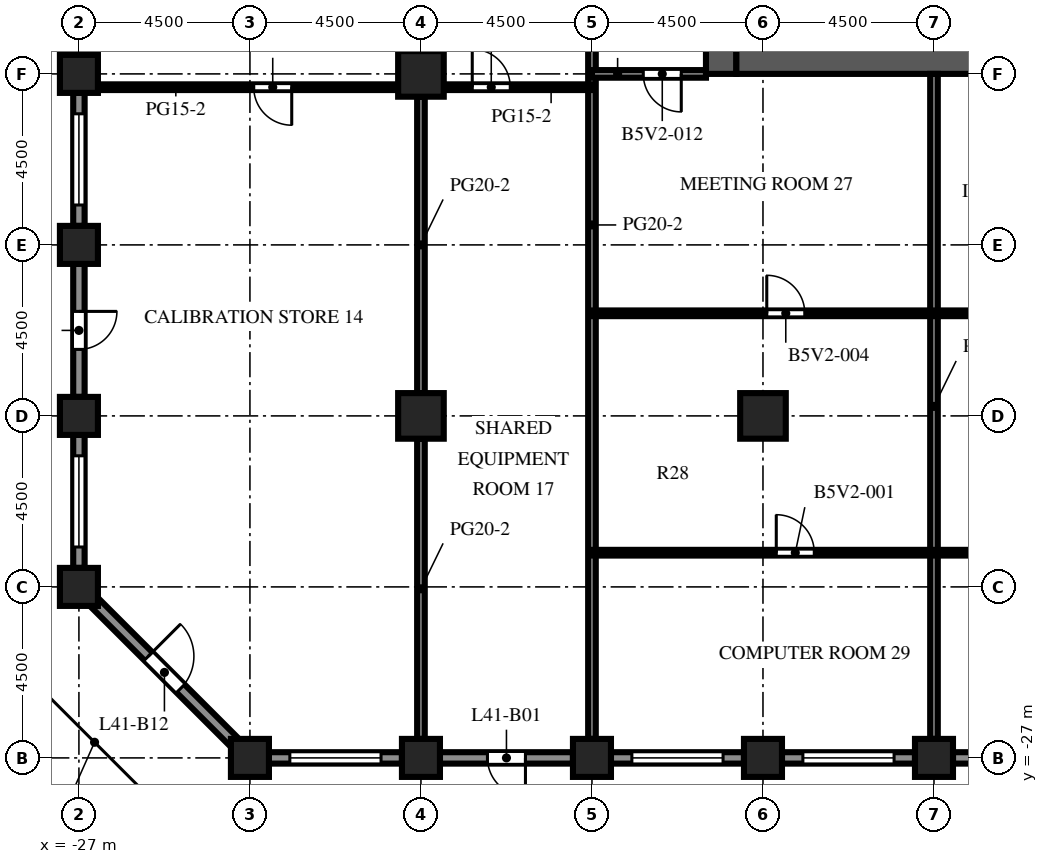
"""IFC4 building model, lengths in metres.
Left out: names, types, materials, properties, quantities, classifications, styles, units other than length and angle.
Written with IfcOpenShell. Run it as: python <this file> out.ifc"""

import sys

from ifc_helpers import new_model, si_unit, direction, frame, frame_2d, origin, origin_2d, place, context, subcontext, project, spatial, rectangle, extrude, element, fill, save


model = new_model("IFC4")
c1 = context("Model", 3, precision=1e-05, world=origin(), true_north=direction((0.0, 1.0)))
c2 = subcontext(c1, "Body", "Model", "MODEL_VIEW")
j1 = project(units=[si_unit("LENGTHUNIT", "METRE"), si_unit("PLANEANGLEUNIT", "RADIAN")], contexts=[c1])
p1 = place(None, origin())
s1 = spatial("IfcSite", under=j1, at=p1, CompositionType="ELEMENT")
p2 = place(p1, origin())
s2 = spatial("IfcBuilding", under=s1, at=p2, CompositionType="ELEMENT")
p3 = place(p2, frame((0.0, 0.0, 181.4)))
s3 = spatial("IfcBuildingStorey", under=s2, at=p3, CompositionType="ELEMENT", Elevation=181.4)
for number, where, z_axis, x_axis in (
    (1, (-27.0, -22.5, 0.0), (0.0, 0.0, 1.0), (1.0, 0.0, 0.0)),
    (2, (-27.0, -18.0, 0.0), (0.0, 0.0, 1.0), (1.0, 0.0, 0.0)),
    (3, (-27.0, -13.5, 0.0), (0.0, 0.0, 1.0), (1.0, 0.0, 0.0)),
    (4, (-27.0, -9.0, 0.0), (0.0, 0.0, 1.0), (1.0, 0.0, 0.0)),
    (5, (-22.5, -27.0, 0.0), (0.0, 0.0, 1.0), (1.0, 0.0, 0.0)),
    (6, (-18.0, -27.0, 0.0), (0.0, 0.0, 1.0), (1.0, 0.0, 0.0)),
    (7, (-13.5, -27.0, 0.0), (0.0, 0.0, 1.0), (1.0, 0.0, 0.0)),
    (8, (-9.0, -27.0, 0.0), (0.0, 0.0, 1.0), (1.0, 0.0, 0.0)),
    (9, (-4.5, -27.0, 0.0), (0.0, 0.0, 1.0), (1.0, 0.0, 0.0)),
):
    element("IfcColumn", number, at=place(p3, frame(where, z_axis=z_axis, x_axis=x_axis)), inside=s3, PredefinedType="COLUMN", context=c2, shape_type="SweptSolid", body=[
        extrude(rectangle(XDim=1.0, YDim=1.0, at=origin_2d()), origin(), (0.0, 0.0, 1.0), 4.1),
    ])
for number, where, z_axis, x_axis in (
    (10, (-18.0, -18.0, 0.0), (0.0, 0.0, 1.0), (1.0, 0.0, 0.0)),
    (11, (-18.0, -9.0, 0.0), (0.0, 0.0, 1.0), (1.0, 0.0, 0.0)),
    (12, (-9.0, -18.0, 0.0), (0.0, 0.0, 1.0), (1.0, 0.0, 0.0)),
):
    element("IfcColumn", number, at=place(p3, frame(where, z_axis=z_axis, x_axis=x_axis)), inside=s3, PredefinedType="COLUMN", context=c2, shape_type="SweptSolid", body=[
        extrude(rectangle(XDim=1.2, YDim=1.2, at=origin_2d()), origin(), (0.0, 0.0, 1.0), 4.1),
    ])
p4 = place(p3, frame((-10.1, -9.0, 0.0), z_axis=(0.0, 0.0, 1.0), x_axis=(0.0, 1.0, 0.0)))
e13 = element("IfcWall", 13, at=p4, inside=s3, PredefinedType="SHEAR", context=c2, shape_type="SweptSolid", body=[
    extrude(rectangle(XDim=27.5, YDim=0.8, at=frame_2d((13.75, 0.0))), origin(), (0.0, 0.0, 1.0), 4.1),
])
p5 = place(p4, frame((12.55, 0.0, 0.0)))
e14 = element("IfcOpeningElement", 14, at=p5, cuts=e13, PredefinedType="OPENING", context=c2, shape_type="SweptSolid", body=[
    extrude(rectangle(XDim=2.4, YDim=2.4, at=frame_2d((1.2, 1.2))), frame((0.0, 0.41, 0.0), z_axis=(0.0, -1.0, 0.0), x_axis=(1.0, 0.0, 0.0)), (0.0, 0.0, 1.0), 0.82),
])
p6 = place(p4, frame((6.825, 0.0, 0.0)))
e15 = element("IfcOpeningElement", 15, at=p6, cuts=e13, PredefinedType="OPENING", context=c2, shape_type="SweptSolid", body=[
    extrude(rectangle(XDim=1.2, YDim=2.1, at=frame_2d((0.6, 1.05))), frame((0.0, 0.41, 0.0), z_axis=(0.0, -1.0, 0.0), x_axis=(1.0, 0.0, 0.0)), (0.0, 0.0, 1.0), 0.82),
])
p7 = place(p4, frame((19.475, 0.0, 0.0)))
e16 = element("IfcOpeningElement", 16, at=p7, cuts=e13, PredefinedType="OPENING", context=c2, shape_type="SweptSolid", body=[
    extrude(rectangle(XDim=1.2, YDim=2.1, at=frame_2d((0.6, 1.05))), frame((0.0, 0.41, 0.0), z_axis=(0.0, -1.0, 0.0), x_axis=(1.0, 0.0, 0.0)), (0.0, 0.0, 1.0), 0.82),
])
p8 = place(p3, frame((-9.7, -8.6, 0.0), z_axis=(0.0, 0.0, 1.0), x_axis=(1.0, 0.0, 0.0)))
e17 = element("IfcWall", 17, at=p8, inside=s3, PredefinedType="SHEAR", context=c2, shape_type="SweptSolid", body=[
    extrude(rectangle(XDim=10.4, YDim=0.8, at=frame_2d((5.2, 0.0))), origin(), (0.0, 0.0, 1.0), 4.1),
])
p9 = place(p3, frame((-18.5, -27.0, 0.0), z_axis=(0.0, 0.0, 1.0), x_axis=(-1.0, 0.0, 0.0)))
e18 = element("IfcWall", 18, at=p9, inside=s3, PredefinedType="SOLIDWALL", context=c2, shape_type="SweptSolid", body=[
    extrude(rectangle(XDim=3.5, YDim=0.3, at=frame_2d((1.75, 0.0))), origin(), (0.0, 0.0, 1.0), 2.7),
])
p10 = place(p9, frame((0.55, 0.0, 0.8)))
e19 = element("IfcOpeningElement", 19, at=p10, cuts=e18, PredefinedType="OPENING", context=c2, shape_type="SweptSolid", body=[
    extrude(rectangle(XDim=2.4, YDim=1.7, at=frame_2d((1.2, 0.85))), frame((0.0, 0.16, 0.0), z_axis=(0.0, -1.0, 0.0), x_axis=(1.0, 0.0, 0.0)), (0.0, 0.0, 1.0), 0.32),
])
p11 = place(p3, frame((-14.0, -27.0, 0.0), z_axis=(0.0, 0.0, 1.0), x_axis=(-1.0, 0.0, 0.0)))
e20 = element("IfcWall", 20, at=p11, inside=s3, PredefinedType="SOLIDWALL", context=c2, shape_type="SweptSolid", body=[
    extrude(rectangle(XDim=3.5, YDim=0.3, at=frame_2d((1.75, 0.0))), origin(), (0.0, 0.0, 1.0), 2.7),
])
p12 = place(p11, frame((1.25, 0.0, 0.0)))
e21 = element("IfcOpeningElement", 21, at=p12, cuts=e20, PredefinedType="OPENING", context=c2, shape_type="SweptSolid", body=[
    extrude(rectangle(XDim=1.0, YDim=2.2, at=frame_2d((0.5, 1.1))), frame((0.0, 0.16, 0.0), z_axis=(0.0, -1.0, 0.0), x_axis=(1.0, 0.0, 0.0)), (0.0, 0.0, 1.0), 0.32),
])
p13 = place(p3, frame((-9.5, -27.0, 0.0), z_axis=(0.0, 0.0, 1.0), x_axis=(-1.0, 0.0, 0.0)))
e22 = element("IfcWall", 22, at=p13, inside=s3, PredefinedType="SOLIDWALL", context=c2, shape_type="SweptSolid", body=[
    extrude(rectangle(XDim=3.5, YDim=0.3, at=frame_2d((1.75, 0.0))), origin(), (0.0, 0.0, 1.0), 2.7),
])
p14 = place(p13, frame((0.55, 0.0, 0.8)))
e23 = element("IfcOpeningElement", 23, at=p14, cuts=e22, PredefinedType="OPENING", context=c2, shape_type="SweptSolid", body=[
    extrude(rectangle(XDim=2.4, YDim=1.7, at=frame_2d((1.2, 0.85))), frame((0.0, 0.16, 0.0), z_axis=(0.0, -1.0, 0.0), x_axis=(1.0, 0.0, 0.0)), (0.0, 0.0, 1.0), 0.32),
])
p15 = place(p3, frame((-5.0, -27.0, 0.0), z_axis=(0.0, 0.0, 1.0), x_axis=(-1.0, 0.0, 0.0)))
e24 = element("IfcWall", 24, at=p15, inside=s3, PredefinedType="SOLIDWALL", context=c2, shape_type="SweptSolid", body=[
    extrude(rectangle(XDim=3.5, YDim=0.3, at=frame_2d((1.75, 0.0))), origin(), (0.0, 0.0, 1.0), 2.7),
])
p16 = place(p15, frame((0.55, 0.0, 0.8)))
e25 = element("IfcOpeningElement", 25, at=p16, cuts=e24, PredefinedType="OPENING", context=c2, shape_type="SweptSolid", body=[
    extrude(rectangle(XDim=2.4, YDim=1.7, at=frame_2d((1.2, 0.85))), frame((0.0, 0.16, 0.0), z_axis=(0.0, -1.0, 0.0), x_axis=(1.0, 0.0, 0.0)), (0.0, 0.0, 1.0), 0.32),
])
p17 = place(p3, frame((-0.5, -27.0, 0.0), z_axis=(0.0, 0.0, 1.0), x_axis=(-1.0, 0.0, 0.0)))
e26 = element("IfcWall", 26, at=p17, inside=s3, PredefinedType="SOLIDWALL", context=c2, shape_type="SweptSolid", body=[
    extrude(rectangle(XDim=3.5, YDim=0.3, at=frame_2d((1.75, 0.0))), origin(), (0.0, 0.0, 1.0), 2.7),
])
p18 = place(p17, frame((0.55, 0.0, 0.8)))
e27 = element("IfcOpeningElement", 27, at=p18, cuts=e26, PredefinedType="OPENING", context=c2, shape_type="SweptSolid", body=[
    extrude(rectangle(XDim=2.4, YDim=1.7, at=frame_2d((1.2, 0.85))), frame((0.0, 0.16, 0.0), z_axis=(0.0, -1.0, 0.0), x_axis=(1.0, 0.0, 0.0)), (0.0, 0.0, 1.0), 0.32),
])
p19 = place(p3, frame((-27.0, -8.5, 0.0), z_axis=(0.0, 0.0, 1.0), x_axis=(0.0, 1.0, 0.0)))
e28 = element("IfcWall", 28, at=p19, inside=s3, PredefinedType="SOLIDWALL", context=c2, shape_type="SweptSolid", body=[
    extrude(rectangle(XDim=3.5, YDim=0.3, at=frame_2d((1.75, 0.0))), origin(), (0.0, 0.0, 1.0), 2.7),
])
p20 = place(p19, frame((0.55, 0.0, 0.8)))
e29 = element("IfcOpeningElement", 29, at=p20, cuts=e28, PredefinedType="OPENING", context=c2, shape_type="SweptSolid", body=[
    extrude(rectangle(XDim=2.4, YDim=1.7, at=frame_2d((1.2, 0.85))), frame((0.0, 0.16, 0.0), z_axis=(0.0, -1.0, 0.0), x_axis=(1.0, 0.0, 0.0)), (0.0, 0.0, 1.0), 0.32),
])
p21 = place(p3, frame((-27.0, -13.0, 0.0), z_axis=(0.0, 0.0, 1.0), x_axis=(0.0, 1.0, 0.0)))
e30 = element("IfcWall", 30, at=p21, inside=s3, PredefinedType="SOLIDWALL", context=c2, shape_type="SweptSolid", body=[
    extrude(rectangle(XDim=3.5, YDim=0.3, at=frame_2d((1.75, 0.0))), origin(), (0.0, 0.0, 1.0), 2.7),
])
p22 = place(p21, frame((0.55, 0.0, 0.8)))
e31 = element("IfcOpeningElement", 31, at=p22, cuts=e30, PredefinedType="OPENING", context=c2, shape_type="SweptSolid", body=[
    extrude(rectangle(XDim=2.4, YDim=1.7, at=frame_2d((1.2, 0.85))), frame((0.0, 0.16, 0.0), z_axis=(0.0, -1.0, 0.0), x_axis=(1.0, 0.0, 0.0)), (0.0, 0.0, 1.0), 0.32),
])
p23 = place(p3, frame((-27.0, -17.5, 0.0), z_axis=(0.0, 0.0, 1.0), x_axis=(0.0, 1.0, 0.0)))
e32 = element("IfcWall", 32, at=p23, inside=s3, PredefinedType="SOLIDWALL", context=c2, shape_type="SweptSolid", body=[
    extrude(rectangle(XDim=3.5, YDim=0.3, at=frame_2d((1.75, 0.0))), origin(), (0.0, 0.0, 1.0), 2.7),
])
p24 = place(p23, frame((1.25, 0.0, 0.0)))
e33 = element("IfcOpeningElement", 33, at=p24, cuts=e32, PredefinedType="OPENING", context=c2, shape_type="SweptSolid", body=[
    extrude(rectangle(XDim=1.0, YDim=2.2, at=frame_2d((0.5, 1.1))), frame((0.0, 0.16, 0.0), z_axis=(0.0, -1.0, 0.0), x_axis=(1.0, 0.0, 0.0)), (0.0, 0.0, 1.0), 0.32),
])
p25 = place(p3, frame((-27.0, -22.0, 0.0), z_axis=(0.0, 0.0, 1.0), x_axis=(0.0, 1.0, 0.0)))
e34 = element("IfcWall", 34, at=p25, inside=s3, PredefinedType="SOLIDWALL", context=c2, shape_type="SweptSolid", body=[
    extrude(rectangle(XDim=3.5, YDim=0.3, at=frame_2d((1.75, 0.0))), origin(), (0.0, 0.0, 1.0), 2.7),
])
p26 = place(p25, frame((0.55, 0.0, 0.8)))
e35 = element("IfcOpeningElement", 35, at=p26, cuts=e34, PredefinedType="OPENING", context=c2, shape_type="SweptSolid", body=[
    extrude(rectangle(XDim=2.4, YDim=1.7, at=frame_2d((1.2, 0.85))), frame((0.0, 0.16, 0.0), z_axis=(0.0, -1.0, 0.0), x_axis=(1.0, 0.0, 0.0)), (0.0, 0.0, 1.0), 0.32),
])
p27 = place(p3, frame((-22.894, -26.606, 0.0), z_axis=(0.0, 0.0, 1.0), x_axis=(-0.707106781187, 0.707106781187, 0.0)))
e36 = element("IfcWall", 36, at=p27, inside=s3, PredefinedType="SOLIDWALL", context=c2, shape_type="SweptSolid", body=[
    extrude(rectangle(XDim=5.25, YDim=0.3, at=frame_2d((2.625, 0.0))), origin(), (0.0, 0.0, 1.0), 2.7),
])
p28 = place(p27, frame((2.025, 0.0, 0.0)))
e37 = element("IfcOpeningElement", 37, at=p28, cuts=e36, PredefinedType="OPENING", context=c2, shape_type="SweptSolid", body=[
    extrude(rectangle(XDim=1.2, YDim=2.2, at=frame_2d((0.6, 1.1))), frame((0.0, 0.16, 0.0), z_axis=(0.0, -1.0, 0.0), x_axis=(1.0, 0.0, 0.0)), (0.0, 0.0, 1.0), 0.32),
])
p29 = place(p3, frame((-18.0, -26.5, 0.0), z_axis=(0.0, 0.0, 1.0), x_axis=(0.0, 1.0, 0.0)))
e38 = element("IfcWall", 38, at=p29, inside=s3, PredefinedType="PARTITIONING", context=c2, shape_type="SweptSolid", body=[
    extrude(rectangle(XDim=7.9, YDim=0.2, at=frame_2d((3.95, 0.0))), origin(), (0.0, 0.0, 1.0), 3.5),
])
p30 = place(p3, frame((-18.0, -17.4, 0.0), z_axis=(0.0, 0.0, 1.0), x_axis=(0.0, 1.0, 0.0)))
e39 = element("IfcWall", 39, at=p30, inside=s3, PredefinedType="PARTITIONING", context=c2, shape_type="SweptSolid", body=[
    extrude(rectangle(XDim=7.8, YDim=0.2, at=frame_2d((3.9, 0.0))), origin(), (0.0, 0.0, 1.0), 3.5),
])
p31 = place(p3, frame((-13.5, -26.5, 0.0), z_axis=(0.0, 0.0, 1.0), x_axis=(0.0, 1.0, 0.0)))
e40 = element("IfcWall", 40, at=p31, inside=s3, PredefinedType="PARTITIONING", context=c2, shape_type="SweptSolid", body=[
    extrude(rectangle(XDim=29.75, YDim=0.2, at=frame_2d((14.875, 0.0))), origin(), (0.0, 0.0, 1.0), 3.5),
])
p32 = place(p31, frame((27.05, 0.0, 0.0)))
e41 = element("IfcOpeningElement", 41, at=p32, cuts=e40, PredefinedType="OPENING", context=c2, shape_type="SweptSolid", body=[
    extrude(rectangle(XDim=1.0, YDim=2.1, at=frame_2d((0.5, 1.05))), frame((0.0, 0.11, 0.0), z_axis=(0.0, -1.0, 0.0), x_axis=(1.0, 0.0, 0.0)), (0.0, 0.0, 1.0), 0.22),
])
p33 = place(p3, frame((-4.5, -26.5, 0.0), z_axis=(0.0, 0.0, 1.0), x_axis=(0.0, 1.0, 0.0)))
e42 = element("IfcWall", 42, at=p33, inside=s3, PredefinedType="PARTITIONING", context=c2, shape_type="SweptSolid", body=[
    extrude(rectangle(XDim=17.5, YDim=0.2, at=frame_2d((8.75, 0.0))), origin(), (0.0, 0.0, 1.0), 3.5),
])
p34 = place(p3, frame((21.0, -21.6, 0.0), z_axis=(0.0, 0.0, 1.0), x_axis=(-1.0, 0.0, 0.0)))
e43 = element("IfcWall", 43, at=p34, inside=s3, PredefinedType="PARTITIONING", context=c2, shape_type="SweptSolid", body=[
    extrude(rectangle(XDim=34.5, YDim=0.15, at=frame_2d((17.25, 0.0))), origin(), (0.0, 0.0, 1.0), 3.5),
])
p35 = place(p34, frame((28.65, 0.0, 0.0)))
e44 = element("IfcOpeningElement", 44, at=p35, cuts=e43, PredefinedType="OPENING", context=c2, shape_type="SweptSolid", body=[
    extrude(rectangle(XDim=1.0, YDim=2.1, at=frame_2d((0.5, 1.05))), frame((0.0, 0.085, 0.0), z_axis=(0.0, -1.0, 0.0), x_axis=(1.0, 0.0, 0.0)), (0.0, 0.0, 1.0), 0.17),
])
p36 = place(p34, frame((16.4, 0.0, 0.0)))
e45 = element("IfcOpeningElement", 45, at=p36, cuts=e43, PredefinedType="OPENING", context=c2, shape_type="SweptSolid", body=[
    extrude(rectangle(XDim=1.0, YDim=2.1, at=frame_2d((0.5, 1.05))), frame((0.0, 0.085, 0.0), z_axis=(0.0, -1.0, 0.0), x_axis=(1.0, 0.0, 0.0)), (0.0, 0.0, 1.0), 0.17),
])
p37 = place(p34, frame((5.15, 0.0, 0.0)))
e46 = element("IfcOpeningElement", 46, at=p37, cuts=e43, PredefinedType="OPENING", context=c2, shape_type="SweptSolid", body=[
    extrude(rectangle(XDim=1.0, YDim=2.1, at=frame_2d((0.5, 1.05))), frame((0.0, 0.085, 0.0), z_axis=(0.0, -1.0, 0.0), x_axis=(1.0, 0.0, 0.0)), (0.0, 0.0, 1.0), 0.17),
])
p38 = place(p3, frame((21.0, -15.3, 0.0), z_axis=(0.0, 0.0, 1.0), x_axis=(-1.0, 0.0, 0.0)))
e47 = element("IfcWall", 47, at=p38, inside=s3, PredefinedType="PARTITIONING", context=c2, shape_type="SweptSolid", body=[
    extrude(rectangle(XDim=34.5, YDim=0.15, at=frame_2d((17.25, 0.0))), origin(), (0.0, 0.0, 1.0), 3.5),
])
p39 = place(p38, frame((28.9, 0.0, 0.0)))
e48 = element("IfcOpeningElement", 48, at=p39, cuts=e47, PredefinedType="OPENING", context=c2, shape_type="SweptSolid", body=[
    extrude(rectangle(XDim=1.0, YDim=2.1, at=frame_2d((0.5, 1.05))), frame((0.0, 0.085, 0.0), z_axis=(0.0, -1.0, 0.0), x_axis=(1.0, 0.0, 0.0)), (0.0, 0.0, 1.0), 0.17),
])
p40 = place(p38, frame((17.15, 0.0, 0.0)))
e49 = element("IfcOpeningElement", 49, at=p40, cuts=e47, PredefinedType="OPENING", context=c2, shape_type="SweptSolid", body=[
    extrude(rectangle(XDim=1.0, YDim=2.1, at=frame_2d((0.5, 1.05))), frame((0.0, 0.085, 0.0), z_axis=(0.0, -1.0, 0.0), x_axis=(1.0, 0.0, 0.0)), (0.0, 0.0, 1.0), 0.17),
])
p41 = place(p38, frame((7.15, 0.0, 0.0)))
e50 = element("IfcOpeningElement", 50, at=p41, cuts=e47, PredefinedType="OPENING", context=c2, shape_type="SweptSolid", body=[
    extrude(rectangle(XDim=1.0, YDim=2.1, at=frame_2d((0.5, 1.05))), frame((0.0, 0.085, 0.0), z_axis=(0.0, -1.0, 0.0), x_axis=(1.0, 0.0, 0.0)), (0.0, 0.0, 1.0), 0.17),
])
p42 = place(p3, frame((-18.6, -9.35, 0.0), z_axis=(0.0, 0.0, 1.0), x_axis=(-1.0, 0.0, 0.0)))
e51 = element("IfcWall", 51, at=p42, inside=s3, PredefinedType="PARTITIONING", context=c2, shape_type="SweptSolid", body=[
    extrude(rectangle(XDim=7.9, YDim=0.15, at=frame_2d((3.95, 0.0))), origin(), (0.0, 0.0, 1.0), 3.5),
])
p43 = place(p42, frame((2.8, 0.0, 0.0)))
e52 = element("IfcOpeningElement", 52, at=p43, cuts=e51, PredefinedType="OPENING", context=c2, shape_type="SweptSolid", body=[
    extrude(rectangle(XDim=1.0, YDim=2.1, at=frame_2d((0.5, 1.05))), frame((0.0, 0.085, 0.0), z_axis=(0.0, -1.0, 0.0), x_axis=(1.0, 0.0, 0.0)), (0.0, 0.0, 1.0), 0.17),
])
p44 = place(p3, frame((-13.5, -9.35, 0.0), z_axis=(0.0, 0.0, 1.0), x_axis=(-1.0, 0.0, 0.0)))
e53 = element("IfcWall", 53, at=p44, inside=s3, PredefinedType="PARTITIONING", context=c2, shape_type="SweptSolid", body=[
    extrude(rectangle(XDim=3.9, YDim=0.15, at=frame_2d((1.95, 0.0))), origin(), (0.0, 0.0, 1.0), 3.5),
])
p45 = place(p44, frame((2.15, 0.0, 0.0)))
e54 = element("IfcOpeningElement", 54, at=p45, cuts=e53, PredefinedType="OPENING", context=c2, shape_type="SweptSolid", body=[
    extrude(rectangle(XDim=1.0, YDim=2.1, at=frame_2d((0.5, 1.05))), frame((0.0, 0.085, 0.0), z_axis=(0.0, -1.0, 0.0), x_axis=(1.0, 0.0, 0.0)), (0.0, 0.0, 1.0), 0.17),
])
p46 = place(p3, frame((-10.5, -9.0, 0.0), z_axis=(0.0, 0.0, 1.0), x_axis=(-1.0, 0.0, 0.0)))
e55 = element("IfcWall", 55, at=p46, inside=s3, PredefinedType="PARTITIONING", context=c2, shape_type="SweptSolid", body=[
    extrude(rectangle(XDim=3.0, YDim=0.2, at=frame_2d((1.5, 0.0))), origin(), (0.0, 0.0, 1.0), 3.5),
])
p47 = place(p46, frame((0.65, 0.0, 0.0)))
e56 = element("IfcOpeningElement", 56, at=p47, cuts=e55, PredefinedType="OPENING", context=c2, shape_type="SweptSolid", body=[
    extrude(rectangle(XDim=1.0, YDim=2.1, at=frame_2d((0.5, 1.05))), frame((0.0, 0.11, 0.0), z_axis=(0.0, -1.0, 0.0), x_axis=(1.0, 0.0, 0.0)), (0.0, 0.0, 1.0), 0.22),
])
p48 = place(p10, origin())
e57 = element("IfcWindow", 57, at=p48, inside=s3, PartitioningType="SINGLE_PANEL", PredefinedType="WINDOW", context=c2, shape_type="SweptSolid", body=[
    extrude(rectangle(XDim=2.4, YDim=1.7, at=frame_2d((1.2, 0.85))), frame((0.0, 0.03, 0.0), z_axis=(0.0, -1.0, 0.0), x_axis=(1.0, 0.0, 0.0)), (0.0, 0.0, 1.0), 0.06),
])
fill(e19, e57)
p49 = place(p12, origin())
e58 = element("IfcDoor", 58, at=p49, inside=s3, OperationType="SINGLE_SWING_LEFT", PredefinedType="DOOR", context=c2, shape_type="SweptSolid", body=[
    extrude(rectangle(XDim=1.0, YDim=2.2, at=frame_2d((0.5, 1.1))), frame((0.0, 0.025, 0.0), z_axis=(0.0, -1.0, 0.0), x_axis=(1.0, 0.0, 0.0)), (0.0, 0.0, 1.0), 0.05),
])
fill(e21, e58)
p50 = place(p14, origin())
e59 = element("IfcWindow", 59, at=p50, inside=s3, PartitioningType="SINGLE_PANEL", PredefinedType="WINDOW", context=c2, shape_type="SweptSolid", body=[
    extrude(rectangle(XDim=2.4, YDim=1.7, at=frame_2d((1.2, 0.85))), frame((0.0, 0.03, 0.0), z_axis=(0.0, -1.0, 0.0), x_axis=(1.0, 0.0, 0.0)), (0.0, 0.0, 1.0), 0.06),
])
fill(e23, e59)
p51 = place(p16, origin())
e60 = element("IfcWindow", 60, at=p51, inside=s3, PartitioningType="SINGLE_PANEL", PredefinedType="WINDOW", context=c2, shape_type="SweptSolid", body=[
    extrude(rectangle(XDim=2.4, YDim=1.7, at=frame_2d((1.2, 0.85))), frame((0.0, 0.03, 0.0), z_axis=(0.0, -1.0, 0.0), x_axis=(1.0, 0.0, 0.0)), (0.0, 0.0, 1.0), 0.06),
])
fill(e25, e60)
p52 = place(p22, origin())
e61 = element("IfcWindow", 61, at=p52, inside=s3, PartitioningType="SINGLE_PANEL", PredefinedType="WINDOW", context=c2, shape_type="SweptSolid", body=[
    extrude(rectangle(XDim=2.4, YDim=1.7, at=frame_2d((1.2, 0.85))), frame((0.0, 0.03, 0.0), z_axis=(0.0, -1.0, 0.0), x_axis=(1.0, 0.0, 0.0)), (0.0, 0.0, 1.0), 0.06),
])
fill(e31, e61)
p53 = place(p24, origin())
e62 = element("IfcDoor", 62, at=p53, inside=s3, OperationType="SINGLE_SWING_RIGHT", PredefinedType="DOOR", context=c2, shape_type="SweptSolid", body=[
    extrude(rectangle(XDim=1.0, YDim=2.2, at=frame_2d((0.5, 1.1))), frame((0.0, 0.025, 0.0), z_axis=(0.0, -1.0, 0.0), x_axis=(1.0, 0.0, 0.0)), (0.0, 0.0, 1.0), 0.05),
])
fill(e33, e62)
p54 = place(p26, origin())
e63 = element("IfcWindow", 63, at=p54, inside=s3, PartitioningType="SINGLE_PANEL", PredefinedType="WINDOW", context=c2, shape_type="SweptSolid", body=[
    extrude(rectangle(XDim=2.4, YDim=1.7, at=frame_2d((1.2, 0.85))), frame((0.0, 0.03, 0.0), z_axis=(0.0, -1.0, 0.0), x_axis=(1.0, 0.0, 0.0)), (0.0, 0.0, 1.0), 0.06),
])
fill(e35, e63)
p55 = place(p28, origin())
e64 = element("IfcDoor", 64, at=p55, inside=s3, OperationType="SINGLE_SWING_RIGHT", PredefinedType="DOOR", context=c2, shape_type="SweptSolid", body=[
    extrude(rectangle(XDim=1.2, YDim=2.2, at=frame_2d((0.6, 1.1))), frame((0.0, 0.025, 0.0), z_axis=(0.0, -1.0, 0.0), x_axis=(1.0, 0.0, 0.0)), (0.0, 0.0, 1.0), 0.05),
])
fill(e37, e64)
p56 = place(p35, origin())
e65 = element("IfcDoor", 65, at=p56, inside=s3, OperationType="SINGLE_SWING_RIGHT", PredefinedType="DOOR", context=c2, shape_type="SweptSolid", body=[
    extrude(rectangle(XDim=1.0, YDim=2.1, at=frame_2d((0.5, 1.05))), frame((0.0, 0.025, 0.0), z_axis=(0.0, -1.0, 0.0), x_axis=(1.0, 0.0, 0.0)), (0.0, 0.0, 1.0), 0.05),
])
fill(e44, e65)
p57 = place(p39, origin())
e66 = element("IfcDoor", 66, at=p57, inside=s3, OperationType="SINGLE_SWING_RIGHT", PredefinedType="DOOR", context=c2, shape_type="SweptSolid", body=[
    extrude(rectangle(XDim=1.0, YDim=2.1, at=frame_2d((0.5, 1.05))), frame((0.0, 0.025, 0.0), z_axis=(0.0, -1.0, 0.0), x_axis=(1.0, 0.0, 0.0)), (0.0, 0.0, 1.0), 0.05),
])
fill(e48, e66)
p58 = place(p43, origin())
e67 = element("IfcDoor", 67, at=p58, inside=s3, OperationType="SINGLE_SWING_LEFT", PredefinedType="DOOR", context=c2, shape_type="SweptSolid", body=[
    extrude(rectangle(XDim=1.0, YDim=2.1, at=frame_2d((0.5, 1.05))), frame((0.0, 0.025, 0.0), z_axis=(0.0, -1.0, 0.0), x_axis=(1.0, 0.0, 0.0)), (0.0, 0.0, 1.0), 0.05),
])
fill(e52, e67)
p59 = place(p45, origin())
e68 = element("IfcDoor", 68, at=p59, inside=s3, OperationType="SINGLE_SWING_RIGHT", PredefinedType="DOOR", context=c2, shape_type="SweptSolid", body=[
    extrude(rectangle(XDim=1.0, YDim=2.1, at=frame_2d((0.5, 1.05))), frame((0.0, 0.025, 0.0), z_axis=(0.0, -1.0, 0.0), x_axis=(1.0, 0.0, 0.0)), (0.0, 0.0, 1.0), 0.05),
])
fill(e54, e68)
p60 = place(p47, origin())
e69 = element("IfcDoor", 69, at=p60, inside=s3, OperationType="SINGLE_SWING_LEFT", PredefinedType="DOOR", context=c2, shape_type="SweptSolid", body=[
    extrude(rectangle(XDim=1.0, YDim=2.1, at=frame_2d((0.5, 1.05))), frame((0.0, 0.025, 0.0), z_axis=(0.0, -1.0, 0.0), x_axis=(1.0, 0.0, 0.0)), (0.0, 0.0, 1.0), 0.05),
])
fill(e56, e69)
save(model, sys.argv[1])
